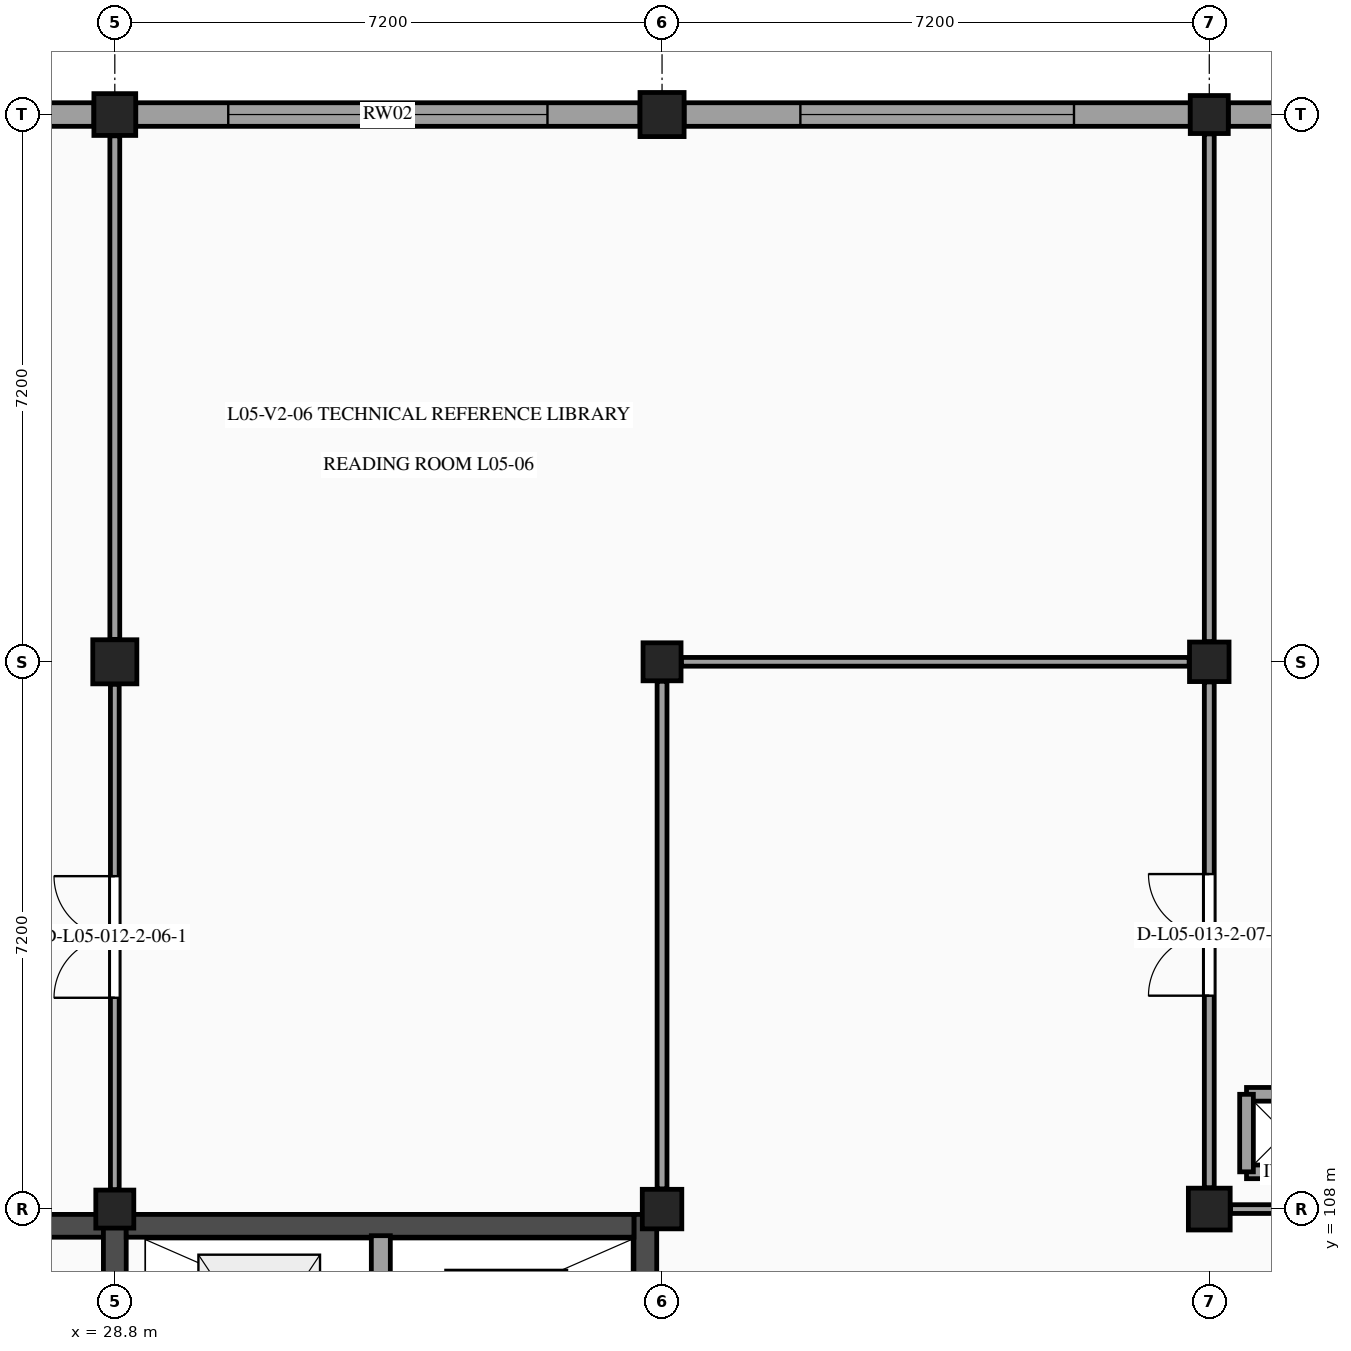
"""IFC4 building model, lengths in metres.
Left out: names, types, materials, properties, quantities, classifications, styles, units other than length and angle.
Written with IfcOpenShell. Run it as: python <this file> out.ifc"""

import sys

from ifc_helpers import new_model, si_unit, direction, frame, frame_2d, origin, origin_2d, place, context, subcontext, project, spatial, rectangle, extrude, element, fill, save


model = new_model("IFC4")
c1 = context("Model", 3, precision=1e-05, world=origin(), true_north=direction((0.0, 1.0)))
c2 = subcontext(c1, "Body", "Model", "MODEL_VIEW")
j1 = project(units=[si_unit("LENGTHUNIT", "METRE"), si_unit("PLANEANGLEUNIT", "RADIAN")], contexts=[c1])
p1 = place(None, origin())
s1 = spatial("IfcSite", under=j1, at=p1, CompositionType="ELEMENT")
p2 = place(p1, origin())
s2 = spatial("IfcBuilding", under=s1, at=p2, CompositionType="ELEMENT")
p3 = place(p2, frame((0.0, 0.0, 22.8)))
s3 = spatial("IfcBuildingStorey", under=s2, at=p3, CompositionType="ELEMENT", Elevation=22.8)
p4 = place(p3, frame((28.8, 108.0, 0.0), z_axis=(0.0, 0.0, 1.0), x_axis=(1.0, 0.0, 0.0)))
e1 = element("IfcColumn", 1, at=p4, inside=s3, PredefinedType="COLUMN", context=c2, shape_type="SweptSolid", body=[
    extrude(rectangle(XDim=0.5, YDim=0.5, at=origin_2d()), origin(), (0.0, 0.0, 1.0), 3.9),
])
p5 = place(p3, frame((28.8, 115.2, 0.0), z_axis=(0.0, 0.0, 1.0), x_axis=(1.0, 0.0, 0.0)))
e2 = element("IfcColumn", 2, at=p5, inside=s3, PredefinedType="COLUMN", context=c2, shape_type="SweptSolid", body=[
    extrude(rectangle(XDim=0.58, YDim=0.58, at=origin_2d()), origin(), (0.0, 0.0, 1.0), 3.9),
])
p6 = place(p3, frame((28.8, 122.4, 0.0), z_axis=(0.0, 0.0, 1.0), x_axis=(1.0, 0.0, 0.0)))
e3 = element("IfcColumn", 3, at=p6, inside=s3, PredefinedType="COLUMN", context=c2, shape_type="SweptSolid", body=[
    extrude(rectangle(XDim=0.55, YDim=0.55, at=origin_2d()), origin(), (0.0, 0.0, 1.0), 3.9),
])
p7 = place(p3, frame((36.0, 108.0, 0.0), z_axis=(0.0, 0.0, 1.0), x_axis=(1.0, 0.0, 0.0)))
e4 = element("IfcColumn", 4, at=p7, inside=s3, PredefinedType="COLUMN", context=c2, shape_type="SweptSolid", body=[
    extrude(rectangle(XDim=0.52, YDim=0.52, at=origin_2d()), origin(), (0.0, 0.0, 1.0), 3.9),
])
p8 = place(p3, frame((36.0, 115.2, 0.0), z_axis=(0.0, 0.0, 1.0), x_axis=(1.0, 0.0, 0.0)))
e5 = element("IfcColumn", 5, at=p8, inside=s3, PredefinedType="COLUMN", context=c2, shape_type="SweptSolid", body=[
    extrude(rectangle(XDim=0.5, YDim=0.5, at=origin_2d()), origin(), (0.0, 0.0, 1.0), 3.9),
])
p9 = place(p3, frame((36.0, 122.4, 0.0), z_axis=(0.0, 0.0, 1.0), x_axis=(1.0, 0.0, 0.0)))
e6 = element("IfcColumn", 6, at=p9, inside=s3, PredefinedType="COLUMN", context=c2, shape_type="SweptSolid", body=[
    extrude(rectangle(XDim=0.58, YDim=0.58, at=origin_2d()), origin(), (0.0, 0.0, 1.0), 3.9),
])
p10 = place(p3, frame((43.2, 108.0, 0.0), z_axis=(0.0, 0.0, 1.0), x_axis=(1.0, 0.0, 0.0)))
e7 = element("IfcColumn", 7, at=p10, inside=s3, PredefinedType="COLUMN", context=c2, shape_type="SweptSolid", body=[
    extrude(rectangle(XDim=0.55, YDim=0.55, at=origin_2d()), origin(), (0.0, 0.0, 1.0), 3.9),
])
p11 = place(p3, frame((43.2, 115.2, 0.0), z_axis=(0.0, 0.0, 1.0), x_axis=(1.0, 0.0, 0.0)))
e8 = element("IfcColumn", 8, at=p11, inside=s3, PredefinedType="COLUMN", context=c2, shape_type="SweptSolid", body=[
    extrude(rectangle(XDim=0.52, YDim=0.52, at=origin_2d()), origin(), (0.0, 0.0, 1.0), 3.9),
])
p12 = place(p3, frame((43.2, 122.4, 0.0), z_axis=(0.0, 0.0, 1.0), x_axis=(1.0, 0.0, 0.0)))
e9 = element("IfcColumn", 9, at=p12, inside=s3, PredefinedType="COLUMN", context=c2, shape_type="SweptSolid", body=[
    extrude(rectangle(XDim=0.5, YDim=0.5, at=origin_2d()), origin(), (0.0, 0.0, 1.0), 3.9),
])
p13 = place(p3, frame((21.86, 122.4, 0.0), z_axis=(0.0, 0.0, 1.0), x_axis=(1.0, 0.0, 0.0)))
e10 = element("IfcWall", 10, at=p13, inside=s3, PredefinedType="STANDARD", context=c2, shape_type="SweptSolid", body=[
    extrude(rectangle(XDim=6.665, YDim=0.31, at=frame_2d((3.333, 0.0))), origin(), (0.0, 0.0, 1.0), 3.095),
])
p14 = place(p13, frame((0.933, 0.0, 0.98)))
e11 = element("IfcOpeningElement", 11, at=p14, cuts=e10, PredefinedType="OPENING", context=c2, shape_type="SweptSolid", body=[
    extrude(rectangle(XDim=4.8, YDim=1.5, at=frame_2d((2.4, 0.75))), frame((0.0, 0.165, 0.0), z_axis=(0.0, -1.0, 0.0), x_axis=(1.0, 0.0, 0.0)), (0.0, 0.0, 1.0), 0.33),
])
p15 = place(p3, frame((29.075, 122.4, 0.0), z_axis=(0.0, 0.0, 1.0), x_axis=(1.0, 0.0, 0.0)))
e12 = element("IfcWall", 12, at=p15, inside=s3, PredefinedType="STANDARD", context=c2, shape_type="SweptSolid", body=[
    extrude(rectangle(XDim=6.635, YDim=0.31, at=frame_2d((3.317, 0.0))), origin(), (0.0, 0.0, 1.0), 3.095),
])
p16 = place(p15, frame((1.218, 0.0, 0.98)))
e13 = element("IfcOpeningElement", 13, at=p16, cuts=e12, PredefinedType="OPENING", context=c2, shape_type="SweptSolid", body=[
    extrude(rectangle(XDim=4.2, YDim=1.5, at=frame_2d((2.1, 0.75))), frame((0.0, 0.165, 0.0), z_axis=(0.0, -1.0, 0.0), x_axis=(1.0, 0.0, 0.0)), (0.0, 0.0, 1.0), 0.33),
])
p17 = place(p3, frame((36.29, 122.4, 0.0), z_axis=(0.0, 0.0, 1.0), x_axis=(1.0, 0.0, 0.0)))
e14 = element("IfcWall", 14, at=p17, inside=s3, PredefinedType="STANDARD", context=c2, shape_type="SweptSolid", body=[
    extrude(rectangle(XDim=6.66, YDim=0.31, at=frame_2d((3.33, 0.0))), origin(), (0.0, 0.0, 1.0), 3.095),
])
p18 = place(p17, frame((1.53, 0.0, 0.98)))
e15 = element("IfcOpeningElement", 15, at=p18, cuts=e14, PredefinedType="OPENING", context=c2, shape_type="SweptSolid", body=[
    extrude(rectangle(XDim=3.6, YDim=1.5, at=frame_2d((1.8, 0.75))), frame((0.0, 0.165, 0.0), z_axis=(0.0, -1.0, 0.0), x_axis=(1.0, 0.0, 0.0)), (0.0, 0.0, 1.0), 0.33),
])
p19 = place(p3, frame((43.45, 122.4, 0.0), z_axis=(0.0, 0.0, 1.0), x_axis=(1.0, 0.0, 0.0)))
e16 = element("IfcWall", 16, at=p19, inside=s3, PredefinedType="STANDARD", context=c2, shape_type="SweptSolid", body=[
    extrude(rectangle(XDim=6.69, YDim=0.31, at=frame_2d((3.345, 0.0))), origin(), (0.0, 0.0, 1.0), 3.095),
])
p20 = place(p19, frame((1.745, 0.0, 0.98)))
e17 = element("IfcOpeningElement", 17, at=p20, cuts=e16, PredefinedType="OPENING", context=c2, shape_type="SweptSolid", body=[
    extrude(rectangle(XDim=3.2, YDim=1.45, at=frame_2d((1.6, 0.725))), frame((0.0, 0.165, 0.0), z_axis=(0.0, -1.0, 0.0), x_axis=(1.0, 0.0, 0.0)), (0.0, 0.0, 1.0), 0.33),
])
p21 = place(p3, frame((21.97, 107.78, 0.0), z_axis=(0.0, 0.0, 1.0), x_axis=(1.0, 0.0, 0.0)))
e18 = element("IfcWall", 18, at=p21, inside=s3, PredefinedType="SHEAR", context=c2, shape_type="SweptSolid", body=[
    extrude(rectangle(XDim=6.68, YDim=0.3, at=frame_2d((3.34, 0.0))), origin(), (0.0, 0.0, 1.0), 3.67),
])
p22 = place(p21, frame((1.42, 0.0, 0.0)))
e19 = element("IfcOpeningElement", 19, at=p22, cuts=e18, PredefinedType="OPENING", context=c2, shape_type="SweptSolid", body=[
    extrude(rectangle(XDim=0.85, YDim=2.1, at=frame_2d((0.425, 1.05))), frame((0.0, 0.16, 0.0), z_axis=(0.0, -1.0, 0.0), x_axis=(1.0, 0.0, 0.0)), (0.0, 0.0, 1.0), 0.32),
])
p23 = place(p21, frame((3.4, 0.0, 0.0)))
e20 = element("IfcOpeningElement", 20, at=p23, cuts=e18, PredefinedType="OPENING", context=c2, shape_type="SweptSolid", body=[
    extrude(rectangle(XDim=0.95, YDim=2.15, at=frame_2d((0.475, 1.075))), frame((0.0, 0.16, 0.0), z_axis=(0.0, -1.0, 0.0), x_axis=(1.0, 0.0, 0.0)), (0.0, 0.0, 1.0), 0.32),
])
p24 = place(p3, frame((28.8, 100.87, 0.0), z_axis=(0.0, 0.0, 1.0), x_axis=(0.0, 1.0, 0.0)))
e21 = element("IfcWall", 21, at=p24, inside=s3, PredefinedType="SHEAR", context=c2, shape_type="SweptSolid", body=[
    extrude(rectangle(XDim=7.06, YDim=0.3, at=frame_2d((3.53, 0.0))), origin(), (0.0, 0.0, 1.0), 3.67),
])
p25 = place(p24, frame((1.4, 0.0, 0.0)))
e22 = element("IfcOpeningElement", 22, at=p25, cuts=e21, PredefinedType="OPENING", context=c2, shape_type="SweptSolid", body=[
    extrude(rectangle(XDim=1.8, YDim=2.2, at=frame_2d((0.9, 1.1))), frame((0.0, 0.16, 0.0), z_axis=(0.0, -1.0, 0.0), x_axis=(1.0, 0.0, 0.0)), (0.0, 0.0, 1.0), 0.32),
])
p26 = place(p3, frame((35.78, 100.87, 0.0), z_axis=(0.0, 0.0, 1.0), x_axis=(0.0, 1.0, 0.0)))
e23 = element("IfcWall", 23, at=p26, inside=s3, PredefinedType="SHEAR", context=c2, shape_type="SweptSolid", body=[
    extrude(rectangle(XDim=7.06, YDim=0.3, at=frame_2d((3.53, 0.0))), origin(), (0.0, 0.0, 1.0), 3.67),
])
p27 = place(p3, frame((28.95, 107.78, 0.0), z_axis=(0.0, 0.0, 1.0), x_axis=(1.0, 0.0, 0.0)))
e24 = element("IfcWall", 24, at=p27, inside=s3, PredefinedType="SHEAR", context=c2, shape_type="SweptSolid", body=[
    extrude(rectangle(XDim=6.68, YDim=0.3, at=frame_2d((3.34, 0.0))), origin(), (0.0, 0.0, 1.0), 3.67),
])
p28 = place(p3, frame((32.3, 104.78, 0.0), z_axis=(0.0, 0.0, 1.0), x_axis=(0.0, 1.0, 0.0)))
e25 = element("IfcWall", 25, at=p28, inside=s3, PredefinedType="PARTITIONING", context=c2, shape_type="SweptSolid", body=[
    extrude(rectangle(XDim=2.87, YDim=0.25, at=frame_2d((1.435, 0.0))), origin(), (0.0, 0.0, 1.0), 3.67),
])
for number, where, z_axis, x_axis in (
    (26, (43.69, 108.49, 0.0), (0.0, 0.0, 1.0), (1.0, 0.0, 0.0)),
    (27, (44.71, 109.51, 0.0), (0.0, 0.0, 1.0), (-1.0, 0.0, 0.0)),
    (28, (43.69, 109.51, 0.0), (0.0, 0.0, 1.0), (0.0, -1.0, 0.0)),
):
    element("IfcWall", number, at=place(p3, frame(where, z_axis=z_axis, x_axis=x_axis)), inside=s3, PredefinedType="PARTITIONING", context=c2, shape_type="SweptSolid", body=[
        extrude(rectangle(XDim=1.02, YDim=0.18, at=frame_2d((0.51, 0.0))), origin(), (0.0, 0.0, 1.0), 3.67),
    ])
p29 = place(p3, frame((28.8, 108.255, 0.0), z_axis=(0.0, 0.0, 1.0), x_axis=(0.0, 1.0, 0.0)))
e29 = element("IfcWall", 29, at=p29, inside=s3, PredefinedType="PARTITIONING", context=c2, shape_type="SweptSolid", body=[
    extrude(rectangle(XDim=6.65, YDim=0.115, at=frame_2d((3.325, 0.0))), origin(), (0.0, 0.0, 1.0), 3.27),
])
p30 = place(p29, frame((2.525, 0.0, 0.0)))
e30 = element("IfcOpeningElement", 30, at=p30, cuts=e29, PredefinedType="OPENING", context=c2, shape_type="SweptSolid", body=[
    extrude(rectangle(XDim=1.6, YDim=2.2, at=frame_2d((0.8, 1.1))), frame((0.0, 0.067, 0.0), z_axis=(0.0, -1.0, 0.0), x_axis=(1.0, 0.0, 0.0)), (0.0, 0.0, 1.0), 0.135),
])
p31 = place(p3, frame((28.8, 115.495, 0.0), z_axis=(0.0, 0.0, 1.0), x_axis=(0.0, 1.0, 0.0)))
e31 = element("IfcWall", 31, at=p31, inside=s3, PredefinedType="PARTITIONING", context=c2, shape_type="SweptSolid", body=[
    extrude(rectangle(XDim=6.625, YDim=0.13, at=frame_2d((3.312, 0.0))), origin(), (0.0, 0.0, 1.0), 3.265),
])
p32 = place(p3, frame((36.0, 108.265, 0.0), z_axis=(0.0, 0.0, 1.0), x_axis=(0.0, 1.0, 0.0)))
e32 = element("IfcWall", 32, at=p32, inside=s3, PredefinedType="PARTITIONING", context=c2, shape_type="SweptSolid", body=[
    extrude(rectangle(XDim=6.68, YDim=0.13, at=frame_2d((3.34, 0.0))), origin(), (0.0, 0.0, 1.0), 3.27),
])
p33 = place(p3, frame((43.2, 108.28, 0.0), z_axis=(0.0, 0.0, 1.0), x_axis=(0.0, 1.0, 0.0)))
e33 = element("IfcWall", 33, at=p33, inside=s3, PredefinedType="PARTITIONING", context=c2, shape_type="SweptSolid", body=[
    extrude(rectangle(XDim=6.655, YDim=0.13, at=frame_2d((3.328, 0.0))), origin(), (0.0, 0.0, 1.0), 3.27),
])
p34 = place(p33, frame((2.528, 0.0, 0.0)))
e34 = element("IfcOpeningElement", 34, at=p34, cuts=e33, PredefinedType="OPENING", context=c2, shape_type="SweptSolid", body=[
    extrude(rectangle(XDim=1.6, YDim=2.2, at=frame_2d((0.8, 1.1))), frame((0.0, 0.075, 0.0), z_axis=(0.0, -1.0, 0.0), x_axis=(1.0, 0.0, 0.0)), (0.0, 0.0, 1.0), 0.15),
])
p35 = place(p3, frame((36.255, 115.2, 0.0), z_axis=(0.0, 0.0, 1.0), x_axis=(1.0, 0.0, 0.0)))
e35 = element("IfcWall", 35, at=p35, inside=s3, PredefinedType="PARTITIONING", context=c2, shape_type="SweptSolid", body=[
    extrude(rectangle(XDim=6.68, YDim=0.115, at=frame_2d((3.34, 0.0))), origin(), (0.0, 0.0, 1.0), 3.12),
])
p36 = place(p3, frame((43.2, 115.465, 0.0), z_axis=(0.0, 0.0, 1.0), x_axis=(0.0, 1.0, 0.0)))
e36 = element("IfcWall", 36, at=p36, inside=s3, PredefinedType="PARTITIONING", context=c2, shape_type="SweptSolid", body=[
    extrude(rectangle(XDim=6.68, YDim=0.13, at=frame_2d((3.34, 0.0))), origin(), (0.0, 0.0, 1.0), 3.265),
])
p37 = place(p3, frame((43.48, 108.0, 0.0), z_axis=(0.0, 0.0, 1.0), x_axis=(1.0, 0.0, 0.0)))
e37 = element("IfcWall", 37, at=p37, inside=s3, PredefinedType="PARTITIONING", context=c2, shape_type="SweptSolid", body=[
    extrude(rectangle(XDim=6.625, YDim=0.115, at=frame_2d((3.312, 0.0))), origin(), (0.0, 0.0, 1.0), 3.15),
])
p38 = place(p16, origin())
e38 = element("IfcWindow", 38, at=p38, inside=s3, PartitioningType="SINGLE_PANEL", PredefinedType="WINDOW", context=c2, shape_type="SweptSolid", body=[
    extrude(rectangle(XDim=4.2, YDim=1.5, at=frame_2d((2.1, 0.75))), frame((0.0, -0.03, 0.0), z_axis=(0.0, -1.0, 0.0), x_axis=(1.0, 0.0, 0.0)), (0.0, 0.0, 1.0), 0.06),
])
fill(e13, e38)
p39 = place(p18, origin())
e39 = element("IfcWindow", 39, at=p39, inside=s3, PartitioningType="SINGLE_PANEL", PredefinedType="WINDOW", context=c2, shape_type="SweptSolid", body=[
    extrude(rectangle(XDim=3.6, YDim=1.5, at=frame_2d((1.8, 0.75))), frame((0.0, -0.03, 0.0), z_axis=(0.0, -1.0, 0.0), x_axis=(1.0, 0.0, 0.0)), (0.0, 0.0, 1.0), 0.06),
])
fill(e15, e39)
p40 = place(p30, origin())
e40 = element("IfcDoor", 40, at=p40, inside=s3, OperationType="DOUBLE_DOOR_SINGLE_SWING", PredefinedType="DOOR", context=c2, shape_type="SweptSolid", body=[
    extrude(rectangle(XDim=1.6, YDim=2.2, at=frame_2d((0.8, 1.1))), frame((0.0, 0.025, 0.0), z_axis=(0.0, -1.0, 0.0), x_axis=(1.0, 0.0, 0.0)), (0.0, 0.0, 1.0), 0.05),
])
fill(e30, e40)
p41 = place(p34, origin())
e41 = element("IfcDoor", 41, at=p41, inside=s3, OperationType="DOUBLE_DOOR_SINGLE_SWING", PredefinedType="DOOR", context=c2, shape_type="SweptSolid", body=[
    extrude(rectangle(XDim=1.6, YDim=2.2, at=frame_2d((0.8, 1.1))), frame((0.0, 0.025, 0.0), z_axis=(0.0, -1.0, 0.0), x_axis=(1.0, 0.0, 0.0)), (0.0, 0.0, 1.0), 0.05),
])
fill(e34, e41)
save(model, sys.argv[1])
